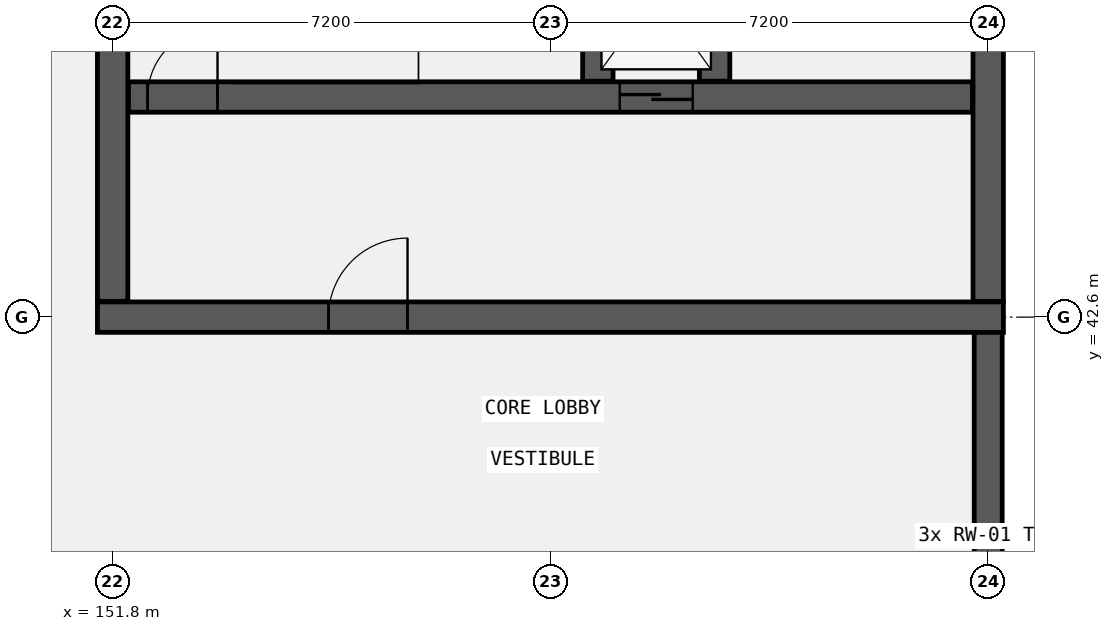
"""IFC4 building model, lengths in metres.
Left out: names, types, materials, properties, quantities, classifications, styles, units other than length and angle.
Written with IfcOpenShell. Run it as: python <this file> out.ifc"""

import sys

from ifc_helpers import new_model, si_unit, direction, frame, frame_2d, origin, place, context, subcontext, project, spatial, rectangle, extrude, element, fill, save


model = new_model("IFC4")
c1 = context("Model", 3, precision=1e-05, world=origin(), true_north=direction((0.0, 1.0)))
c2 = subcontext(c1, "Body", "Model", "MODEL_VIEW")
j1 = project(units=[si_unit("LENGTHUNIT", "METRE"), si_unit("PLANEANGLEUNIT", "RADIAN")], contexts=[c1])
p1 = place(None, origin())
s1 = spatial("IfcSite", under=j1, at=p1, CompositionType="ELEMENT")
p2 = place(p1, origin())
s2 = spatial("IfcBuilding", under=s1, at=p2, CompositionType="ELEMENT")
p3 = place(p2, frame((0.0, 0.0, -8.4)))
s3 = spatial("IfcBuildingStorey", under=s2, at=p3, CompositionType="ELEMENT", Elevation=-8.4)
p4 = place(p3, frame((166.2, 42.37, 0.0), z_axis=(0.0, 0.0, 1.0), x_axis=(0.0, -1.0, 0.0)))
e1 = element("IfcWall", 1, at=p4, inside=s3, PredefinedType="USERDEFINED", context=c2, shape_type="SweptSolid", body=[
    extrude(rectangle(XDim=6.75, YDim=0.46, at=frame_2d((3.375, 0.0))), origin(), (0.0, 0.0, 1.0), 3.2),
])
p5 = place(p3, frame((151.55, 42.6, 0.0), z_axis=(0.0, 0.0, 1.0), x_axis=(1.0, 0.0, 0.0)))
e2 = element("IfcWall", 2, at=p5, inside=s3, PredefinedType="SHEAR", context=c2, shape_type="SweptSolid", body=[
    extrude(rectangle(XDim=14.9, YDim=0.5, at=frame_2d((7.45, 0.0))), origin(), (0.0, 0.0, 1.0), 4.2),
])
p6 = place(p5, frame((3.8, 0.0, 0.0)))
e3 = element("IfcOpeningElement", 3, at=p6, cuts=e2, PredefinedType="OPENING", context=c2, shape_type="SweptSolid", body=[
    extrude(rectangle(XDim=1.3, YDim=2.2, at=frame_2d((0.65, 1.1))), frame((0.0, 0.26, 0.0), z_axis=(0.0, -1.0, 0.0), x_axis=(1.0, 0.0, 0.0)), (0.0, 0.0, 1.0), 0.52),
])
for number, where, z_axis, x_axis in (
    (4, (151.8, 42.86, 0.0), (0.0, 0.0, 1.0), (0.0, 1.0, 0.0)),
    (5, (166.2, 42.86, 0.0), (0.0, 0.0, 1.0), (0.0, 1.0, 0.0)),
):
    element("IfcWall", number, at=place(p3, frame(where, z_axis=z_axis, x_axis=x_axis)), inside=s3, PredefinedType="SHEAR", context=c2, shape_type="SweptSolid", body=[
        extrude(rectangle(XDim=6.68, YDim=0.5, at=frame_2d((3.34, 0.0))), origin(), (0.0, 0.0, 1.0), 4.2),
    ])
p7 = place(p3, frame((152.06, 46.22, 0.0), z_axis=(0.0, 0.0, 1.0), x_axis=(1.0, 0.0, 0.0)))
e6 = element("IfcWall", 6, at=p7, inside=s3, PredefinedType="SHEAR", context=c2, shape_type="SweptSolid", body=[
    extrude(rectangle(XDim=13.88, YDim=0.5, at=frame_2d((6.94, 0.0))), origin(), (0.0, 0.0, 1.0), 4.2),
])
p8 = place(p7, frame((8.08, 0.0, 0.0)))
e7 = element("IfcOpeningElement", 7, at=p8, cuts=e6, PredefinedType="OPENING", context=c2, shape_type="SweptSolid", body=[
    extrude(rectangle(XDim=1.2, YDim=2.15, at=frame_2d((0.6, 1.075))), frame((0.0, 0.26, 0.0), z_axis=(0.0, -1.0, 0.0), x_axis=(1.0, 0.0, 0.0)), (0.0, 0.0, 1.0), 0.52),
])
p9 = place(p7, frame((0.315, 0.0, 0.0)))
e8 = element("IfcOpeningElement", 8, at=p9, cuts=e6, PredefinedType="OPENING", context=c2, shape_type="SweptSolid", body=[
    extrude(rectangle(XDim=1.15, YDim=2.15, at=frame_2d((0.575, 1.075))), frame((0.0, 0.26, 0.0), z_axis=(0.0, -1.0, 0.0), x_axis=(1.0, 0.0, 0.0)), (0.0, 0.0, 1.0), 0.52),
])
for number, where, z_axis, x_axis in (
    (9, (159.78, 46.48, 0.0), (0.0, 0.0, 1.0), (0.0, 1.0, 0.0)),
    (10, (161.7, 46.48, 0.0), (0.0, 0.0, 1.0), (0.0, 1.0, 0.0)),
):
    element("IfcWall", number, at=place(p3, frame(where, z_axis=z_axis, x_axis=x_axis)), inside=s3, PredefinedType="SHEAR", context=c2, shape_type="SweptSolid", body=[
        extrude(rectangle(XDim=3.06, YDim=0.5, at=frame_2d((1.53, 0.0))), origin(), (0.0, 0.0, 1.0), 4.2),
    ])
p10 = place(p8, frame((1.2, 0.0, 0.0), z_axis=(0.0, 0.0, 1.0), x_axis=(-1.0, 0.0, 0.0)))
e11 = element("IfcDoor", 11, at=p10, inside=s3, OperationType="DOUBLE_DOOR_SLIDING", PredefinedType="DOOR", context=c2, shape_type="SweptSolid", body=[
    extrude(rectangle(XDim=1.2, YDim=2.15, at=frame_2d((0.6, 1.075))), frame((0.0, 0.025, 0.0), z_axis=(0.0, -1.0, 0.0), x_axis=(1.0, 0.0, 0.0)), (0.0, 0.0, 1.0), 0.05),
])
fill(e7, e11)
p11 = place(p9, origin())
e12 = element("IfcDoor", 12, at=p11, inside=s3, OperationType="SINGLE_SWING_RIGHT", PredefinedType="DOOR", context=c2, shape_type="SweptSolid", body=[
    extrude(rectangle(XDim=1.15, YDim=2.15, at=frame_2d((0.575, 1.075))), frame((0.0, 0.025, 0.0), z_axis=(0.0, -1.0, 0.0), x_axis=(1.0, 0.0, 0.0)), (0.0, 0.0, 1.0), 0.05),
])
fill(e8, e12)
p12 = place(p6, frame((1.3, 0.0, 0.0), z_axis=(0.0, 0.0, 1.0), x_axis=(-1.0, 0.0, 0.0)))
e13 = element("IfcDoor", 13, at=p12, inside=s3, OperationType="SINGLE_SWING_RIGHT", PredefinedType="DOOR", context=c2, shape_type="SweptSolid", body=[
    extrude(rectangle(XDim=1.3, YDim=2.2, at=frame_2d((0.65, 1.1))), frame((0.0, 0.025, 0.0), z_axis=(0.0, -1.0, 0.0), x_axis=(1.0, 0.0, 0.0)), (0.0, 0.0, 1.0), 0.05),
])
fill(e3, e13)
save(model, sys.argv[1])
